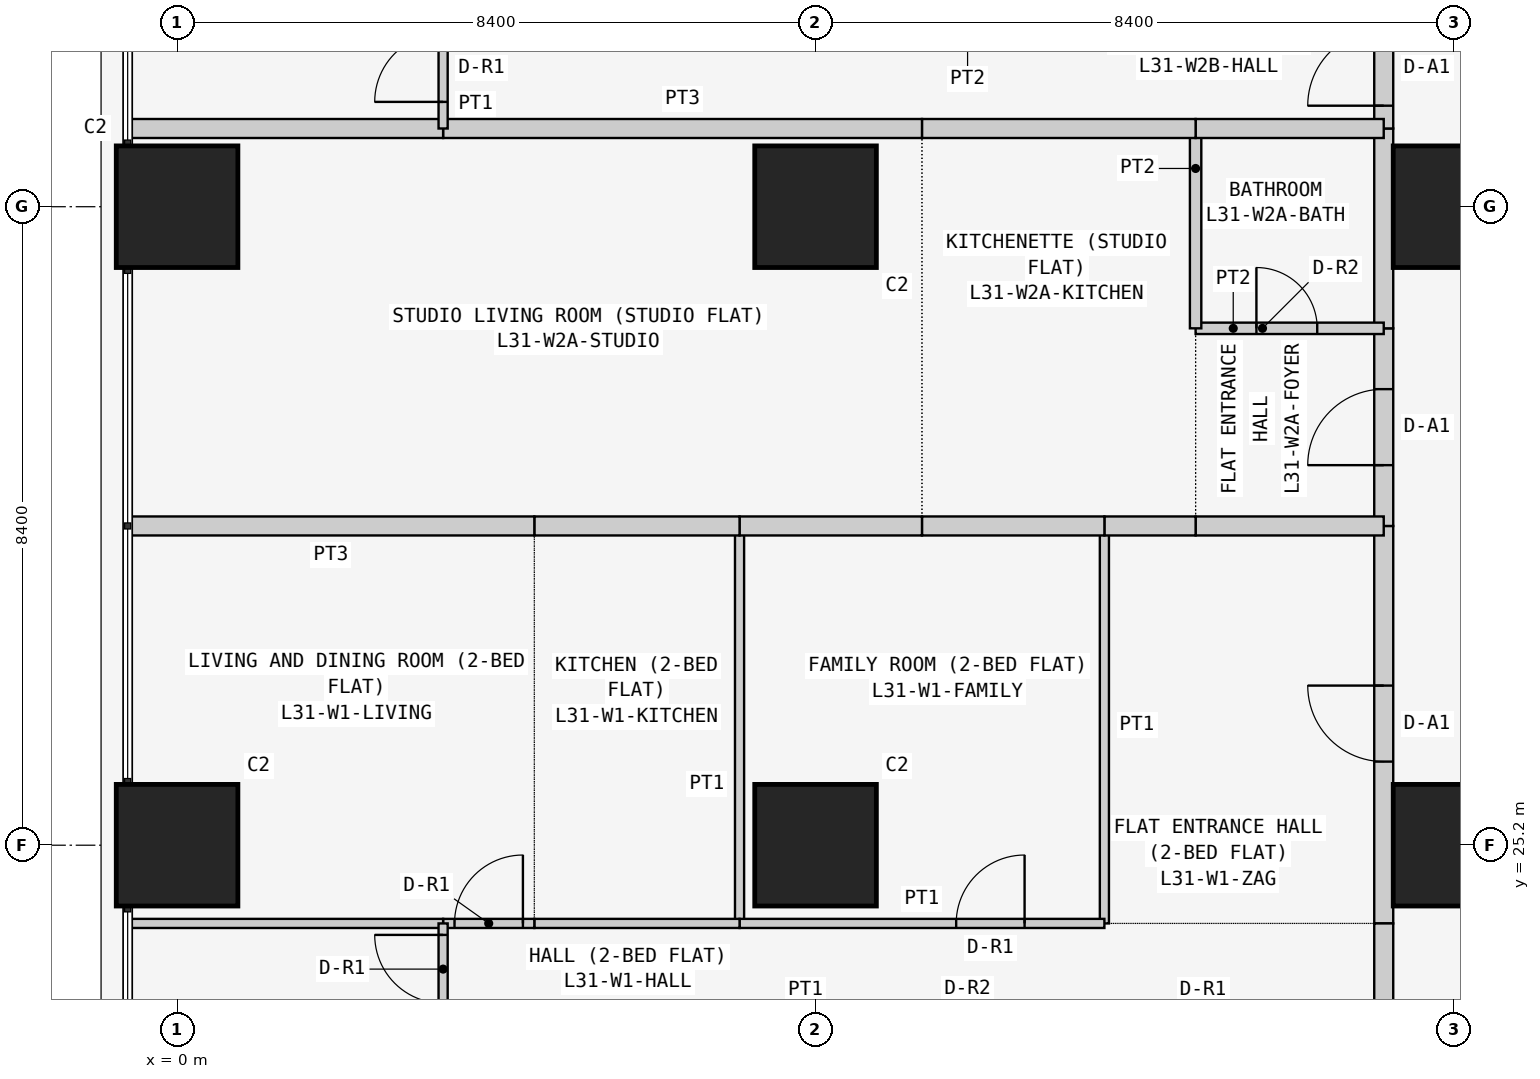
"""IFC4 building model, lengths in metres.
Left out: names, types, materials, properties, quantities, classifications, styles, units other than length and angle.
Written with IfcOpenShell. Run it as: python <this file> out.ifc"""

import sys

from ifc_helpers import new_model, si_unit, direction, frame, frame_2d, origin, origin_2d, place, context, subcontext, project, spatial, rectangle, extrude, element, fill, save


model = new_model("IFC4")
c1 = context("Model", 3, precision=1e-05, world=origin(), true_north=direction((0.0, 1.0)))
c2 = subcontext(c1, "Body", "Model", "MODEL_VIEW")
j1 = project(units=[si_unit("LENGTHUNIT", "METRE"), si_unit("PLANEANGLEUNIT", "RADIAN")], contexts=[c1])
p1 = place(None, origin())
s1 = spatial("IfcSite", under=j1, at=p1, CompositionType="ELEMENT")
p2 = place(p1, origin())
s2 = spatial("IfcBuilding", under=s1, at=p2, CompositionType="ELEMENT")
p3 = place(p2, frame((0.0, 0.0, 123.3)))
s3 = spatial("IfcBuildingStorey", under=s2, at=p3, CompositionType="ELEMENT", Elevation=123.3)
for number, where, z_axis, x_axis in (
    (1, (0.0, 25.2, 0.0), (0.0, 0.0, 1.0), (1.0, 0.0, 0.0)),
    (2, (0.0, 33.6, 0.0), (0.0, 0.0, 1.0), (1.0, 0.0, 0.0)),
    (3, (8.4, 25.2, 0.0), (0.0, 0.0, 1.0), (1.0, 0.0, 0.0)),
    (4, (8.4, 33.6, 0.0), (0.0, 0.0, 1.0), (1.0, 0.0, 0.0)),
    (5, (16.8, 25.2, 0.0), (0.0, 0.0, 1.0), (1.0, 0.0, 0.0)),
    (6, (16.8, 33.6, 0.0), (0.0, 0.0, 1.0), (1.0, 0.0, 0.0)),
):
    element("IfcColumn", number, at=place(p3, frame(where, z_axis=z_axis, x_axis=x_axis)), inside=s3, PredefinedType="COLUMN", context=c2, shape_type="SweptSolid", body=[
        extrude(rectangle(XDim=1.6, YDim=1.6, at=origin_2d()), origin(), (0.0, 0.0, 1.0), 3.6),
    ])
p4 = place(p3, frame((15.875, 24.171, 0.0), z_axis=(0.0, 0.0, 1.0), x_axis=(0.0, 1.0, 0.0)))
e7 = element("IfcWall", 7, at=p4, inside=s3, PredefinedType="PARTITIONING", context=c2, shape_type="SweptSolid", body=[
    extrude(rectangle(XDim=5.229, YDim=0.25, at=frame_2d((2.615, 0.0))), origin(), (0.0, 0.0, 1.0), 3.45),
])
p5 = place(p4, frame((2.129, 0.0, 0.0)))
e8 = element("IfcOpeningElement", 8, at=p5, cuts=e7, PredefinedType="OPENING", context=c2, shape_type="SweptSolid", body=[
    extrude(rectangle(XDim=1.0, YDim=2.1, at=frame_2d((0.5, 1.05))), frame((0.0, 0.135, 0.0), z_axis=(0.0, -1.0, 0.0), x_axis=(1.0, 0.0, 0.0)), (0.0, 0.0, 1.0), 0.27),
])
p6 = place(p3, frame((15.875, 22.971, 0.0), z_axis=(0.0, 0.0, 1.0), x_axis=(0.0, 1.0, 0.0)))
e9 = element("IfcWall", 9, at=p6, inside=s3, PredefinedType="PARTITIONING", context=c2, shape_type="SweptSolid", body=[
    extrude(rectangle(XDim=1.2, YDim=0.25, at=frame_2d((0.6, 0.0))), origin(), (0.0, 0.0, 1.0), 3.45),
])
p7 = place(p3, frame((15.875, 29.4, 0.0), z_axis=(0.0, 0.0, 1.0), x_axis=(0.0, 1.0, 0.0)))
e10 = element("IfcWall", 10, at=p7, inside=s3, PredefinedType="PARTITIONING", context=c2, shape_type="SweptSolid", body=[
    extrude(rectangle(XDim=2.6, YDim=0.25, at=frame_2d((1.3, 0.0))), origin(), (0.0, 0.0, 1.0), 3.45),
])
p8 = place(p7, frame((0.8, 0.0, 0.0)))
e11 = element("IfcOpeningElement", 11, at=p8, cuts=e10, PredefinedType="OPENING", context=c2, shape_type="SweptSolid", body=[
    extrude(rectangle(XDim=1.0, YDim=2.1, at=frame_2d((0.5, 1.05))), frame((0.0, 0.135, 0.0), z_axis=(0.0, -1.0, 0.0), x_axis=(1.0, 0.0, 0.0)), (0.0, 0.0, 1.0), 0.27),
])
p9 = place(p3, frame((15.875, 32.0, 0.0), z_axis=(0.0, 0.0, 1.0), x_axis=(0.0, 1.0, 0.0)))
e12 = element("IfcWall", 12, at=p9, inside=s3, PredefinedType="PARTITIONING", context=c2, shape_type="SweptSolid", body=[
    extrude(rectangle(XDim=2.629, YDim=0.25, at=frame_2d((1.314, 0.0))), origin(), (0.0, 0.0, 1.0), 3.45),
])
p10 = place(p3, frame((15.875, 34.629, 0.0), z_axis=(0.0, 0.0, 1.0), x_axis=(0.0, 1.0, 0.0)))
e13 = element("IfcWall", 13, at=p10, inside=s3, PredefinedType="PARTITIONING", context=c2, shape_type="SweptSolid", body=[
    extrude(rectangle(XDim=1.6, YDim=0.25, at=frame_2d((0.8, 0.0))), origin(), (0.0, 0.0, 1.0), 3.45),
])
p11 = place(p10, frame((0.3, 0.0, 0.0)))
e14 = element("IfcOpeningElement", 14, at=p11, cuts=e13, PredefinedType="OPENING", context=c2, shape_type="SweptSolid", body=[
    extrude(rectangle(XDim=1.0, YDim=2.1, at=frame_2d((0.5, 1.05))), frame((0.0, 0.135, 0.0), z_axis=(0.0, -1.0, 0.0), x_axis=(1.0, 0.0, 0.0)), (0.0, 0.0, 1.0), 0.27),
])
p12 = place(p3, frame((12.2, 29.4, 0.0), z_axis=(0.0, 0.0, 1.0), x_axis=(0.0, -1.0, 0.0)))
e15 = element("IfcWall", 15, at=p12, inside=s3, PredefinedType="PARTITIONING", context=c2, shape_type="SweptSolid", body=[
    extrude(rectangle(XDim=5.229, YDim=0.12, at=frame_2d((2.615, 0.0))), origin(), (0.0, 0.0, 1.0), 3.45),
])
p13 = place(p3, frame((15.875, 29.4, 0.0), z_axis=(0.0, 0.0, 1.0), x_axis=(-1.0, 0.0, 0.0)))
e16 = element("IfcWall", 16, at=p13, inside=s3, PredefinedType="PARTITIONING", context=c2, shape_type="SweptSolid", body=[
    extrude(rectangle(XDim=2.475, YDim=0.25, at=frame_2d((1.238, 0.0))), origin(), (0.0, 0.0, 1.0), 3.45),
])
p14 = place(p3, frame((13.4, 29.4, 0.0), z_axis=(0.0, 0.0, 1.0), x_axis=(-1.0, 0.0, 0.0)))
e17 = element("IfcWall", 17, at=p14, inside=s3, PredefinedType="PARTITIONING", context=c2, shape_type="SweptSolid", body=[
    extrude(rectangle(XDim=1.2, YDim=0.25, at=frame_2d((0.6, 0.0))), origin(), (0.0, 0.0, 1.0), 3.45),
])
p15 = place(p3, frame((7.4, 29.4, 0.0), z_axis=(0.0, 0.0, 1.0), x_axis=(0.0, -1.0, 0.0)))
e18 = element("IfcWall", 18, at=p15, inside=s3, PredefinedType="PARTITIONING", context=c2, shape_type="SweptSolid", body=[
    extrude(rectangle(XDim=5.229, YDim=0.12, at=frame_2d((2.615, 0.0))), origin(), (0.0, 0.0, 1.0), 3.45),
])
p16 = place(p3, frame((7.4, 24.171, 0.0), z_axis=(0.0, 0.0, 1.0), x_axis=(1.0, 0.0, 0.0)))
e19 = element("IfcWall", 19, at=p16, inside=s3, PredefinedType="PARTITIONING", context=c2, shape_type="SweptSolid", body=[
    extrude(rectangle(XDim=4.8, YDim=0.12, at=frame_2d((2.4, 0.0))), origin(), (0.0, 0.0, 1.0), 3.45),
])
p17 = place(p16, frame((2.85, 0.0, 0.0)))
e20 = element("IfcOpeningElement", 20, at=p17, cuts=e19, PredefinedType="OPENING", context=c2, shape_type="SweptSolid", body=[
    extrude(rectangle(XDim=0.9, YDim=2.1, at=frame_2d((0.45, 1.05))), frame((0.0, 0.07, 0.0), z_axis=(0.0, -1.0, 0.0), x_axis=(1.0, 0.0, 0.0)), (0.0, 0.0, 1.0), 0.14),
])
p18 = place(p3, frame((12.2, 29.4, 0.0), z_axis=(0.0, 0.0, 1.0), x_axis=(-1.0, 0.0, 0.0)))
e21 = element("IfcWall", 21, at=p18, inside=s3, PredefinedType="PARTITIONING", context=c2, shape_type="SweptSolid", body=[
    extrude(rectangle(XDim=2.4, YDim=0.25, at=frame_2d((1.2, 0.0))), origin(), (0.0, 0.0, 1.0), 3.45),
])
p19 = place(p3, frame((9.8, 29.4, 0.0), z_axis=(0.0, 0.0, 1.0), x_axis=(-1.0, 0.0, 0.0)))
e22 = element("IfcWall", 22, at=p19, inside=s3, PredefinedType="PARTITIONING", context=c2, shape_type="SweptSolid", body=[
    extrude(rectangle(XDim=2.4, YDim=0.25, at=frame_2d((1.2, 0.0))), origin(), (0.0, 0.0, 1.0), 3.45),
])
p20 = place(p3, frame((4.7, 24.171, 0.0), z_axis=(0.0, 0.0, 1.0), x_axis=(1.0, 0.0, 0.0)))
e23 = element("IfcWall", 23, at=p20, inside=s3, PredefinedType="PARTITIONING", context=c2, shape_type="SweptSolid", body=[
    extrude(rectangle(XDim=2.7, YDim=0.12, at=frame_2d((1.35, 0.0))), origin(), (0.0, 0.0, 1.0), 3.45),
])
p21 = place(p3, frame((7.4, 29.4, 0.0), z_axis=(0.0, 0.0, 1.0), x_axis=(-1.0, 0.0, 0.0)))
e24 = element("IfcWall", 24, at=p21, inside=s3, PredefinedType="PARTITIONING", context=c2, shape_type="SweptSolid", body=[
    extrude(rectangle(XDim=2.7, YDim=0.25, at=frame_2d((1.35, 0.0))), origin(), (0.0, 0.0, 1.0), 3.45),
])
p22 = place(p3, frame((3.5, 24.171, 0.0), z_axis=(0.0, 0.0, 1.0), x_axis=(1.0, 0.0, 0.0)))
e25 = element("IfcWall", 25, at=p22, inside=s3, PredefinedType="PARTITIONING", context=c2, shape_type="SweptSolid", body=[
    extrude(rectangle(XDim=1.2, YDim=0.12, at=frame_2d((0.6, 0.0))), origin(), (0.0, 0.0, 1.0), 3.45),
])
p23 = place(p22, frame((0.15, 0.0, 0.0)))
e26 = element("IfcOpeningElement", 26, at=p23, cuts=e25, PredefinedType="OPENING", context=c2, shape_type="SweptSolid", body=[
    extrude(rectangle(XDim=0.9, YDim=2.1, at=frame_2d((0.45, 1.05))), frame((0.0, 0.07, 0.0), z_axis=(0.0, -1.0, 0.0), x_axis=(1.0, 0.0, 0.0)), (0.0, 0.0, 1.0), 0.14),
])
p24 = place(p3, frame((-0.65, 24.171, 0.0), z_axis=(0.0, 0.0, 1.0), x_axis=(1.0, 0.0, 0.0)))
e27 = element("IfcWall", 27, at=p24, inside=s3, PredefinedType="PARTITIONING", context=c2, shape_type="SweptSolid", body=[
    extrude(rectangle(XDim=4.15, YDim=0.12, at=frame_2d((2.075, 0.0))), origin(), (0.0, 0.0, 1.0), 3.45),
])
p25 = place(p3, frame((4.7, 29.4, 0.0), z_axis=(0.0, 0.0, 1.0), x_axis=(-1.0, 0.0, 0.0)))
e28 = element("IfcWall", 28, at=p25, inside=s3, PredefinedType="PARTITIONING", context=c2, shape_type="SweptSolid", body=[
    extrude(rectangle(XDim=5.35, YDim=0.25, at=frame_2d((2.675, 0.0))), origin(), (0.0, 0.0, 1.0), 3.45),
])
p26 = place(p3, frame((3.5, 24.171, 0.0), z_axis=(0.0, 0.0, 1.0), x_axis=(0.0, -1.0, 0.0)))
e29 = element("IfcWall", 29, at=p26, inside=s3, PredefinedType="PARTITIONING", context=c2, shape_type="SweptSolid", body=[
    extrude(rectangle(XDim=1.2, YDim=0.12, at=frame_2d((0.6, 0.0))), origin(), (0.0, 0.0, 1.0), 3.45),
])
p27 = place(p26, frame((0.151, 0.0, 0.0)))
e30 = element("IfcOpeningElement", 30, at=p27, cuts=e29, PredefinedType="OPENING", context=c2, shape_type="SweptSolid", body=[
    extrude(rectangle(XDim=0.9, YDim=2.1, at=frame_2d((0.45, 1.05))), frame((0.0, 0.07, 0.0), z_axis=(0.0, -1.0, 0.0), x_axis=(1.0, 0.0, 0.0)), (0.0, 0.0, 1.0), 0.14),
])
p28 = place(p3, frame((13.4, 32.0, 0.0), z_axis=(0.0, 0.0, 1.0), x_axis=(1.0, 0.0, 0.0)))
e31 = element("IfcWall", 31, at=p28, inside=s3, PredefinedType="PARTITIONING", context=c2, shape_type="SweptSolid", body=[
    extrude(rectangle(XDim=2.475, YDim=0.15, at=frame_2d((1.238, 0.0))), origin(), (0.0, 0.0, 1.0), 3.45),
])
p29 = place(p28, frame((0.8, 0.0, 0.0)))
e32 = element("IfcOpeningElement", 32, at=p29, cuts=e31, PredefinedType="OPENING", context=c2, shape_type="SweptSolid", body=[
    extrude(rectangle(XDim=0.8, YDim=2.1, at=frame_2d((0.4, 1.05))), frame((0.0, 0.085, 0.0), z_axis=(0.0, -1.0, 0.0), x_axis=(1.0, 0.0, 0.0)), (0.0, 0.0, 1.0), 0.17),
])
p30 = place(p3, frame((13.4, 32.0, 0.0), z_axis=(0.0, 0.0, 1.0), x_axis=(0.0, 1.0, 0.0)))
e33 = element("IfcWall", 33, at=p30, inside=s3, PredefinedType="PARTITIONING", context=c2, shape_type="SweptSolid", body=[
    extrude(rectangle(XDim=2.629, YDim=0.15, at=frame_2d((1.314, 0.0))), origin(), (0.0, 0.0, 1.0), 3.45),
])
p31 = place(p3, frame((13.4, 34.629, 0.0), z_axis=(0.0, 0.0, 1.0), x_axis=(1.0, 0.0, 0.0)))
e34 = element("IfcWall", 34, at=p31, inside=s3, PredefinedType="PARTITIONING", context=c2, shape_type="SweptSolid", body=[
    extrude(rectangle(XDim=2.475, YDim=0.25, at=frame_2d((1.238, 0.0))), origin(), (0.0, 0.0, 1.0), 3.45),
])
p32 = place(p3, frame((9.8, 34.629, 0.0), z_axis=(0.0, 0.0, 1.0), x_axis=(1.0, 0.0, 0.0)))
e35 = element("IfcWall", 35, at=p32, inside=s3, PredefinedType="PARTITIONING", context=c2, shape_type="SweptSolid", body=[
    extrude(rectangle(XDim=3.6, YDim=0.25, at=frame_2d((1.8, 0.0))), origin(), (0.0, 0.0, 1.0), 3.45),
])
p33 = place(p3, frame((3.5, 34.629, 0.0), z_axis=(0.0, 0.0, 1.0), x_axis=(1.0, 0.0, 0.0)))
e36 = element("IfcWall", 36, at=p33, inside=s3, PredefinedType="PARTITIONING", context=c2, shape_type="SweptSolid", body=[
    extrude(rectangle(XDim=6.3, YDim=0.25, at=frame_2d((3.15, 0.0))), origin(), (0.0, 0.0, 1.0), 3.45),
])
p34 = place(p3, frame((-0.65, 34.629, 0.0), z_axis=(0.0, 0.0, 1.0), x_axis=(1.0, 0.0, 0.0)))
e37 = element("IfcWall", 37, at=p34, inside=s3, PredefinedType="PARTITIONING", context=c2, shape_type="SweptSolid", body=[
    extrude(rectangle(XDim=4.15, YDim=0.25, at=frame_2d((2.075, 0.0))), origin(), (0.0, 0.0, 1.0), 3.45),
])
p35 = place(p3, frame((3.5, 34.629, 0.0), z_axis=(0.0, 0.0, 1.0), x_axis=(0.0, 1.0, 0.0)))
e38 = element("IfcWall", 38, at=p35, inside=s3, PredefinedType="PARTITIONING", context=c2, shape_type="SweptSolid", body=[
    extrude(rectangle(XDim=1.6, YDim=0.12, at=frame_2d((0.8, 0.0))), origin(), (0.0, 0.0, 1.0), 3.45),
])
p36 = place(p35, frame((0.35, 0.0, 0.0)))
e39 = element("IfcOpeningElement", 39, at=p36, cuts=e38, PredefinedType="OPENING", context=c2, shape_type="SweptSolid", body=[
    extrude(rectangle(XDim=0.9, YDim=2.1, at=frame_2d((0.45, 1.05))), frame((0.0, 0.07, 0.0), z_axis=(0.0, -1.0, 0.0), x_axis=(1.0, 0.0, 0.0)), (0.0, 0.0, 1.0), 0.14),
])
p37 = place(p5, origin())
e40 = element("IfcDoor", 40, at=p37, inside=s3, OperationType="SINGLE_SWING_RIGHT", PredefinedType="DOOR", context=c2, shape_type="SweptSolid", body=[
    extrude(rectangle(XDim=1.0, YDim=2.1, at=frame_2d((0.5, 1.05))), frame((0.0, 0.025, 0.0), z_axis=(0.0, -1.0, 0.0), x_axis=(1.0, 0.0, 0.0)), (0.0, 0.0, 1.0), 0.05),
])
fill(e8, e40)
p38 = place(p17, origin())
e41 = element("IfcDoor", 41, at=p38, inside=s3, OperationType="SINGLE_SWING_RIGHT", PredefinedType="DOOR", context=c2, shape_type="SweptSolid", body=[
    extrude(rectangle(XDim=0.9, YDim=2.1, at=frame_2d((0.45, 1.05))), frame((0.0, 0.025, 0.0), z_axis=(0.0, -1.0, 0.0), x_axis=(1.0, 0.0, 0.0)), (0.0, 0.0, 1.0), 0.05),
])
fill(e20, e41)
p39 = place(p23, origin())
e42 = element("IfcDoor", 42, at=p39, inside=s3, OperationType="SINGLE_SWING_RIGHT", PredefinedType="DOOR", context=c2, shape_type="SweptSolid", body=[
    extrude(rectangle(XDim=0.9, YDim=2.1, at=frame_2d((0.45, 1.05))), frame((0.0, 0.025, 0.0), z_axis=(0.0, -1.0, 0.0), x_axis=(1.0, 0.0, 0.0)), (0.0, 0.0, 1.0), 0.05),
])
fill(e26, e42)
p40 = place(p27, frame((0.9, 0.0, 0.0), z_axis=(0.0, 0.0, 1.0), x_axis=(-1.0, 0.0, 0.0)))
e43 = element("IfcDoor", 43, at=p40, inside=s3, OperationType="SINGLE_SWING_RIGHT", PredefinedType="DOOR", context=c2, shape_type="SweptSolid", body=[
    extrude(rectangle(XDim=0.9, YDim=2.1, at=frame_2d((0.45, 1.05))), frame((0.0, 0.025, 0.0), z_axis=(0.0, -1.0, 0.0), x_axis=(1.0, 0.0, 0.0)), (0.0, 0.0, 1.0), 0.05),
])
fill(e30, e43)
p41 = place(p8, origin())
e44 = element("IfcDoor", 44, at=p41, inside=s3, OperationType="SINGLE_SWING_LEFT", PredefinedType="DOOR", context=c2, shape_type="SweptSolid", body=[
    extrude(rectangle(XDim=1.0, YDim=2.1, at=frame_2d((0.5, 1.05))), frame((0.0, 0.025, 0.0), z_axis=(0.0, -1.0, 0.0), x_axis=(1.0, 0.0, 0.0)), (0.0, 0.0, 1.0), 0.05),
])
fill(e11, e44)
p42 = place(p29, origin())
e45 = element("IfcDoor", 45, at=p42, inside=s3, OperationType="SINGLE_SWING_LEFT", PredefinedType="DOOR", context=c2, shape_type="SweptSolid", body=[
    extrude(rectangle(XDim=0.8, YDim=2.1, at=frame_2d((0.4, 1.05))), frame((0.0, 0.025, 0.0), z_axis=(0.0, -1.0, 0.0), x_axis=(1.0, 0.0, 0.0)), (0.0, 0.0, 1.0), 0.05),
])
fill(e32, e45)
p43 = place(p11, origin())
e46 = element("IfcDoor", 46, at=p43, inside=s3, OperationType="SINGLE_SWING_LEFT", PredefinedType="DOOR", context=c2, shape_type="SweptSolid", body=[
    extrude(rectangle(XDim=1.0, YDim=2.1, at=frame_2d((0.5, 1.05))), frame((0.0, 0.025, 0.0), z_axis=(0.0, -1.0, 0.0), x_axis=(1.0, 0.0, 0.0)), (0.0, 0.0, 1.0), 0.05),
])
fill(e14, e46)
p44 = place(p36, origin())
e47 = element("IfcDoor", 47, at=p44, inside=s3, OperationType="SINGLE_SWING_LEFT", PredefinedType="DOOR", context=c2, shape_type="SweptSolid", body=[
    extrude(rectangle(XDim=0.9, YDim=2.1, at=frame_2d((0.45, 1.05))), frame((0.0, 0.025, 0.0), z_axis=(0.0, -1.0, 0.0), x_axis=(1.0, 0.0, 0.0)), (0.0, 0.0, 1.0), 0.05),
])
fill(e39, e47)
save(model, sys.argv[1])
